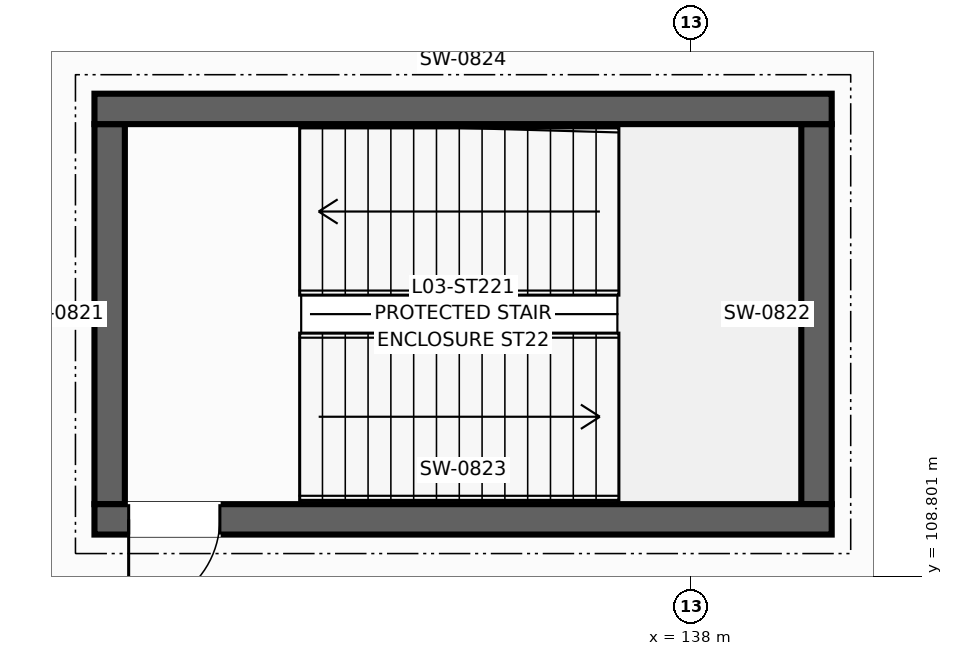
"""IFC4 building model, lengths in metres.
Left out: names, types, materials, properties, quantities, classifications, styles, units other than length and angle.
Written with IfcOpenShell. Run it as: python <this file> out.ifc"""

import sys

from ifc_helpers import new_model, si_unit, direction, frame, frame_2d, origin, place, context, subcontext, project, spatial, rectangle, extrude, element, fill, save


model = new_model("IFC4")
c1 = context("Model", 3, precision=1e-05, world=origin(), true_north=direction((0.0, 1.0)))
c2 = subcontext(c1, "Body", "Model", "MODEL_VIEW")
j1 = project(units=[si_unit("LENGTHUNIT", "METRE"), si_unit("PLANEANGLEUNIT", "RADIAN")], contexts=[c1])
p1 = place(None, origin())
s1 = spatial("IfcSite", under=j1, at=p1, CompositionType="ELEMENT")
p2 = place(p1, origin())
s2 = spatial("IfcBuilding", under=s1, at=p2, CompositionType="ELEMENT")
p3 = place(p2, frame((0.0, 0.0, 13.5)))
s3 = spatial("IfcBuildingStorey", under=s2, at=p3, CompositionType="ELEMENT", Elevation=13.5)
for number, where, z_axis, x_axis in (
    (1, (130.35, 109.75, 0.0), (0.0, 0.0, 1.0), (0.0, 1.0, 0.0)),
    (2, (139.65, 109.75, 0.0), (0.0, 0.0, 1.0), (0.0, 1.0, 0.0)),
):
    element("IfcWall", number, at=place(p3, frame(where, z_axis=z_axis, x_axis=x_axis)), inside=s3, PredefinedType="SHEAR", context=c2, shape_type="SweptSolid", body=[
        extrude(rectangle(XDim=5.0, YDim=0.4, at=frame_2d((2.5, 0.0))), origin(), (0.0, 0.0, 1.0), 4.25),
    ])
p4 = place(p3, frame((130.15, 109.55, 0.0), z_axis=(0.0, 0.0, 1.0), x_axis=(1.0, 0.0, 0.0)))
e3 = element("IfcWall", 3, at=p4, inside=s3, PredefinedType="SHEAR", context=c2, shape_type="SweptSolid", body=[
    extrude(rectangle(XDim=9.7, YDim=0.4, at=frame_2d((4.85, 0.0))), origin(), (0.0, 0.0, 1.0), 4.25),
])
p5 = place(p4, frame((0.45, 0.0, 0.0)))
e4 = element("IfcOpeningElement", 4, at=p5, cuts=e3, PredefinedType="OPENING", context=c2, shape_type="SweptSolid", body=[
    extrude(rectangle(XDim=1.2, YDim=2.2, at=frame_2d((0.6, 1.1))), frame((0.0, 0.21, 0.0), z_axis=(0.0, -1.0, 0.0), x_axis=(1.0, 0.0, 0.0)), (0.0, 0.0, 1.0), 0.42),
])
p6 = place(p3, frame((130.15, 114.95, 0.0), z_axis=(0.0, 0.0, 1.0), x_axis=(1.0, 0.0, 0.0)))
e5 = element("IfcWall", 5, at=p6, inside=s3, PredefinedType="SHEAR", context=c2, shape_type="SweptSolid", body=[
    extrude(rectangle(XDim=9.7, YDim=0.4, at=frame_2d((4.85, 0.0))), origin(), (0.0, 0.0, 1.0), 4.25),
])
p7 = place(p5, frame((1.2, 0.0, 0.0), z_axis=(0.0, 0.0, 1.0), x_axis=(-1.0, 0.0, 0.0)))
e6 = element("IfcDoor", 6, at=p7, inside=s3, OperationType="SINGLE_SWING_LEFT", PredefinedType="DOOR", context=c2, shape_type="SweptSolid", body=[
    extrude(rectangle(XDim=1.2, YDim=2.2, at=frame_2d((0.6, 1.1))), frame((0.0, 0.025, 0.0), z_axis=(0.0, -1.0, 0.0), x_axis=(1.0, 0.0, 0.0)), (0.0, 0.0, 1.0), 0.05),
])
fill(e4, e6)
save(model, sys.argv[1])
